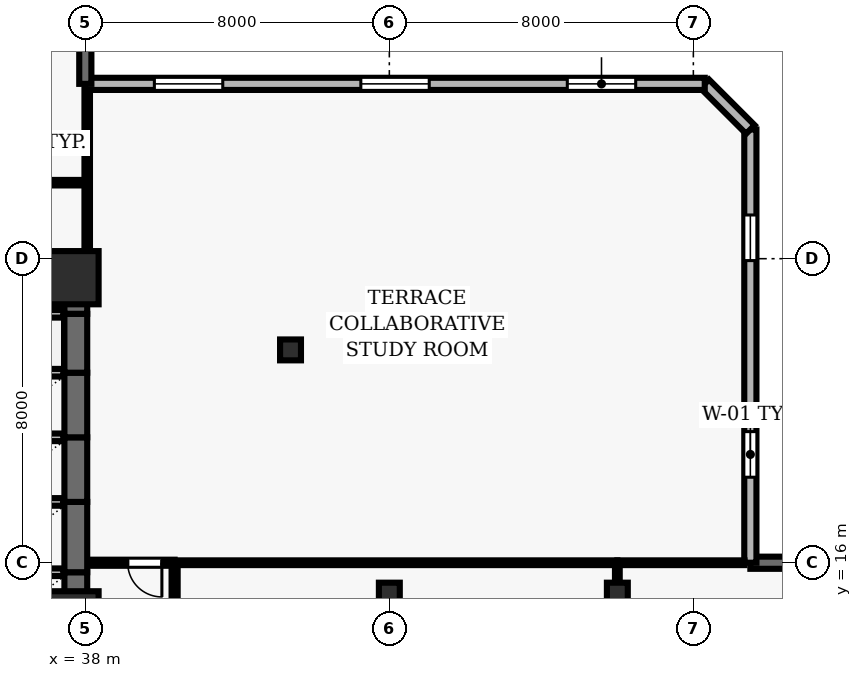
"""IFC4 building model, lengths in metres.
Left out: names, types, materials, properties, quantities, classifications, styles, units other than length and angle.
Written with IfcOpenShell. Run it as: python <this file> out.ifc"""

import sys

from ifc_helpers import new_model, si_unit, direction, frame, frame_2d, origin, origin_2d, place, context, subcontext, project, spatial, rectangle, hollow_rectangle, extrude, element, fill, save


model = new_model("IFC4")
c1 = context("Model", 3, precision=1e-05, world=origin(), true_north=direction((0.0, 1.0)))
c2 = subcontext(c1, "Body", "Model", "MODEL_VIEW")
j1 = project(units=[si_unit("LENGTHUNIT", "METRE"), si_unit("PLANEANGLEUNIT", "RADIAN")], contexts=[c1])
p1 = place(None, origin())
s1 = spatial("IfcSite", under=j1, at=p1, CompositionType="ELEMENT")
p2 = place(p1, origin())
s2 = spatial("IfcBuilding", under=s1, at=p2, CompositionType="ELEMENT")
p3 = place(p2, frame((0.0, 0.0, 34.9)))
s3 = spatial("IfcBuildingStorey", under=s2, at=p3, CompositionType="ELEMENT", Elevation=34.9)
for number, where, z_axis, x_axis in (
    (1, (37.65, 14.55, 0.0), (0.0, 0.0, 1.0), (1.0, 0.0, 0.0)),
    (2, (37.65, 23.5, 0.0), (0.0, 0.0, 1.0), (1.0, 0.0, 0.0)),
):
    element("IfcColumn", number, at=place(p3, frame(where, z_axis=z_axis, x_axis=x_axis)), inside=s3, PredefinedType="COLUMN", context=c2, shape_type="SweptSolid", body=[
        extrude(rectangle(XDim=1.4, YDim=1.4, at=origin_2d()), origin(), (0.0, 0.0, 1.0), 3.9),
    ])
for number, where, z_axis, x_axis in (
    (3, (46.0, 15.2, 0.0), (0.0, 0.0, 1.0), (1.0, 0.0, 0.0)),
    (4, (52.0, 15.2, 0.0), (0.0, 0.0, 1.0), (1.0, 0.0, 0.0)),
    (5, (43.4, 21.6, 0.0), (0.0, 0.0, 1.0), (1.0, 0.0, 0.0)),
):
    element("IfcColumn", number, at=place(p3, frame(where, z_axis=z_axis, x_axis=x_axis)), inside=s3, PredefinedType="COLUMN", context=c2, shape_type="SweptSolid", body=[
        extrude(hollow_rectangle(XDim=0.55, YDim=0.55, WallThickness=0.025, at=origin_2d()), origin(), (0.0, 0.0, 1.0), 3.9),
    ])
p4 = place(p3, frame((73.5, 16.0, 0.0), z_axis=(0.0, 0.0, 1.0), x_axis=(-1.0, 0.0, 0.0)))
e6 = element("IfcWall", 6, at=p4, inside=s3, PredefinedType="SOLIDWALL", context=c2, shape_type="SweptSolid", body=[
    extrude(rectangle(XDim=18.0, YDim=0.32, at=frame_2d((9.0, 0.0))), origin(), (0.0, 0.0, 1.0), 3.69),
])
p5 = place(p4, frame((7.3, 0.0, 0.0)))
e7 = element("IfcOpeningElement", 7, at=p5, cuts=e6, PredefinedType="OPENING", context=c2, shape_type="SweptSolid", body=[
    extrude(rectangle(XDim=1.0, YDim=2.2, at=frame_2d((0.5, 1.1))), frame((0.0, 0.17, 0.0), z_axis=(0.0, -1.0, 0.0), x_axis=(1.0, 0.0, 0.0)), (0.0, 0.0, 1.0), 0.34),
])
p6 = place(p4, frame((1.05, 0.0, 0.9)))
e8 = element("IfcOpeningElement", 8, at=p6, cuts=e6, PredefinedType="OPENING", context=c2, shape_type="SweptSolid", body=[
    extrude(rectangle(XDim=3.0, YDim=2.2, at=frame_2d((1.5, 1.1))), frame((0.0, 0.17, 0.0), z_axis=(0.0, -1.0, 0.0), x_axis=(1.0, 0.0, 0.0)), (0.0, 0.0, 1.0), 0.34),
])
p7 = place(p3, frame((55.5, 16.0, 0.0), z_axis=(0.0, 0.0, 1.0), x_axis=(0.0, 1.0, 0.0)))
e9 = element("IfcWall", 9, at=p7, inside=s3, PredefinedType="SOLIDWALL", context=c2, shape_type="SweptSolid", body=[
    extrude(rectangle(XDim=11.4, YDim=0.32, at=frame_2d((5.7, 0.0))), origin(), (0.0, 0.0, 1.0), 3.69),
])
p8 = place(p7, frame((2.25, 0.0, 0.9)))
e10 = element("IfcOpeningElement", 10, at=p8, cuts=e9, PredefinedType="OPENING", context=c2, shape_type="SweptSolid", body=[
    extrude(rectangle(XDim=1.2, YDim=1.6, at=frame_2d((0.6, 0.8))), frame((0.0, 0.17, 0.0), z_axis=(0.0, -1.0, 0.0), x_axis=(1.0, 0.0, 0.0)), (0.0, 0.0, 1.0), 0.34),
])
p9 = place(p7, frame((7.95, 0.0, 0.9)))
e11 = element("IfcOpeningElement", 11, at=p9, cuts=e9, PredefinedType="OPENING", context=c2, shape_type="SweptSolid", body=[
    extrude(rectangle(XDim=1.2, YDim=1.6, at=frame_2d((0.6, 0.8))), frame((0.0, 0.17, 0.0), z_axis=(0.0, -1.0, 0.0), x_axis=(1.0, 0.0, 0.0)), (0.0, 0.0, 1.0), 0.34),
])
p10 = place(p3, frame((55.5, 27.4, 0.0), z_axis=(0.0, 0.0, 1.0), x_axis=(-0.707034851297, 0.707178703759, 0.0)))
e12 = element("IfcWall", 12, at=p10, inside=s3, PredefinedType="SOLIDWALL", context=c2, shape_type="SweptSolid", body=[
    extrude(rectangle(XDim=1.697, YDim=0.32, at=frame_2d((0.849, 0.0))), origin(), (0.0, 0.0, 1.0), 3.69),
])
p11 = place(p3, frame((54.3, 28.6, 0.0), z_axis=(0.0, 0.0, 1.0), x_axis=(-1.0, 0.0, 0.0)))
e13 = element("IfcWall", 13, at=p11, inside=s3, PredefinedType="SOLIDWALL", context=c2, shape_type="SweptSolid", body=[
    extrude(rectangle(XDim=16.3, YDim=0.32, at=frame_2d((8.15, 0.0))), origin(), (0.0, 0.0, 1.0), 3.69),
])
p12 = place(p11, frame((1.817, 0.0, 0.9)))
e14 = element("IfcOpeningElement", 14, at=p12, cuts=e13, PredefinedType="OPENING", context=c2, shape_type="SweptSolid", body=[
    extrude(rectangle(XDim=1.8, YDim=1.6, at=frame_2d((0.9, 0.8))), frame((0.0, 0.17, 0.0), z_axis=(0.0, -1.0, 0.0), x_axis=(1.0, 0.0, 0.0)), (0.0, 0.0, 1.0), 0.34),
])
p13 = place(p11, frame((7.25, 0.0, 0.9)))
e15 = element("IfcOpeningElement", 15, at=p13, cuts=e13, PredefinedType="OPENING", context=c2, shape_type="SweptSolid", body=[
    extrude(rectangle(XDim=1.8, YDim=1.6, at=frame_2d((0.9, 0.8))), frame((0.0, 0.17, 0.0), z_axis=(0.0, -1.0, 0.0), x_axis=(1.0, 0.0, 0.0)), (0.0, 0.0, 1.0), 0.34),
])
p14 = place(p11, frame((12.683, 0.0, 0.9)))
e16 = element("IfcOpeningElement", 16, at=p14, cuts=e13, PredefinedType="OPENING", context=c2, shape_type="SweptSolid", body=[
    extrude(rectangle(XDim=1.8, YDim=1.6, at=frame_2d((0.9, 0.8))), frame((0.0, 0.17, 0.0), z_axis=(0.0, -1.0, 0.0), x_axis=(1.0, 0.0, 0.0)), (0.0, 0.0, 1.0), 0.34),
])
p15 = place(p3, frame((38.0, 28.6, 0.0), z_axis=(0.0, 0.0, 1.0), x_axis=(0.0, 1.0, 0.0)))
e17 = element("IfcWall", 17, at=p15, inside=s3, PredefinedType="SOLIDWALL", context=c2, shape_type="SweptSolid", body=[
    extrude(rectangle(XDim=22.9, YDim=0.32, at=frame_2d((11.45, 0.0))), origin(), (0.0, 0.0, 1.0), 3.69),
])
p16 = place(p15, frame((9.95, 0.0, 0.0)))
e18 = element("IfcOpeningElement", 18, at=p16, cuts=e17, PredefinedType="OPENING", context=c2, shape_type="SweptSolid", body=[
    extrude(rectangle(XDim=1.0, YDim=2.2, at=frame_2d((0.5, 1.1))), frame((0.0, 0.17, 0.0), z_axis=(0.0, -1.0, 0.0), x_axis=(1.0, 0.0, 0.0)), (0.0, 0.0, 1.0), 0.34),
])
p17 = place(p15, frame((2.262, 0.0, 0.9)))
e19 = element("IfcOpeningElement", 19, at=p17, cuts=e17, PredefinedType="OPENING", context=c2, shape_type="SweptSolid", body=[
    extrude(rectangle(XDim=2.1, YDim=1.6, at=frame_2d((1.05, 0.8))), frame((0.0, 0.17, 0.0), z_axis=(0.0, -1.0, 0.0), x_axis=(1.0, 0.0, 0.0)), (0.0, 0.0, 1.0), 0.34),
])
p18 = place(p15, frame((13.262, 0.0, 0.9)))
e20 = element("IfcOpeningElement", 20, at=p18, cuts=e17, PredefinedType="OPENING", context=c2, shape_type="SweptSolid", body=[
    extrude(rectangle(XDim=2.1, YDim=1.6, at=frame_2d((1.05, 0.8))), frame((0.0, 0.17, 0.0), z_axis=(0.0, -1.0, 0.0), x_axis=(1.0, 0.0, 0.0)), (0.0, 0.0, 1.0), 0.34),
])
p19 = place(p15, frame((18.987, 0.0, 0.9)))
e21 = element("IfcOpeningElement", 21, at=p19, cuts=e17, PredefinedType="OPENING", context=c2, shape_type="SweptSolid", body=[
    extrude(rectangle(XDim=2.1, YDim=1.6, at=frame_2d((1.05, 0.8))), frame((0.0, 0.17, 0.0), z_axis=(0.0, -1.0, 0.0), x_axis=(1.0, 0.0, 0.0)), (0.0, 0.0, 1.0), 0.34),
])
p20 = place(p3, frame((37.75, 13.9, 0.0), z_axis=(0.0, 0.0, 1.0), x_axis=(0.0, 1.0, 0.0)))
e22 = element("IfcWall", 22, at=p20, inside=s3, PredefinedType="SHEAR", context=c2, shape_type="SweptSolid", body=[
    extrude(rectangle(XDim=1.85, YDim=0.6, at=frame_2d((0.925, 0.0))), origin(), (0.0, 0.0, 1.0), 3.69),
])
p21 = place(p3, frame((37.42, 15.75, 0.0), z_axis=(0.0, 0.0, 1.0), x_axis=(-1.0, 0.0, 0.0)))
e23 = element("IfcWall", 23, at=p21, inside=s3, PredefinedType="SOLIDWALL", context=c2, shape_type="SweptSolid", body=[
    extrude(rectangle(XDim=2.14, YDim=0.2, at=frame_2d((1.07, 0.0))), origin(), (0.0, 0.0, 1.0), 3.69),
])
p22 = place(p3, frame((37.75, 15.75, 0.0), z_axis=(0.0, 0.0, 1.0), x_axis=(0.0, 1.0, 0.0)))
e24 = element("IfcWall", 24, at=p22, inside=s3, PredefinedType="SHEAR", context=c2, shape_type="SweptSolid", body=[
    extrude(rectangle(XDim=1.85, YDim=0.6, at=frame_2d((0.925, 0.0))), origin(), (0.0, 0.0, 1.0), 3.69),
])
p23 = place(p3, frame((37.42, 17.6, 0.0), z_axis=(0.0, 0.0, 1.0), x_axis=(-1.0, 0.0, 0.0)))
e25 = element("IfcWall", 25, at=p23, inside=s3, PredefinedType="SOLIDWALL", context=c2, shape_type="SweptSolid", body=[
    extrude(rectangle(XDim=2.14, YDim=0.2, at=frame_2d((1.07, 0.0))), origin(), (0.0, 0.0, 1.0), 3.69),
])
p24 = place(p3, frame((37.75, 17.6, 0.0), z_axis=(0.0, 0.0, 1.0), x_axis=(0.0, 1.0, 0.0)))
e26 = element("IfcWall", 26, at=p24, inside=s3, PredefinedType="SHEAR", context=c2, shape_type="SweptSolid", body=[
    extrude(rectangle(XDim=1.7, YDim=0.6, at=frame_2d((0.85, 0.0))), origin(), (0.0, 0.0, 1.0), 3.69),
])
p25 = place(p3, frame((37.42, 19.3, 0.0), z_axis=(0.0, 0.0, 1.0), x_axis=(-1.0, 0.0, 0.0)))
e27 = element("IfcWall", 27, at=p25, inside=s3, PredefinedType="SOLIDWALL", context=c2, shape_type="SweptSolid", body=[
    extrude(rectangle(XDim=2.14, YDim=0.2, at=frame_2d((1.07, 0.0))), origin(), (0.0, 0.0, 1.0), 3.69),
])
p26 = place(p3, frame((37.75, 19.3, 0.0), z_axis=(0.0, 0.0, 1.0), x_axis=(0.0, 1.0, 0.0)))
e28 = element("IfcWall", 28, at=p26, inside=s3, PredefinedType="SHEAR", context=c2, shape_type="SweptSolid", body=[
    extrude(rectangle(XDim=1.7, YDim=0.6, at=frame_2d((0.85, 0.0))), origin(), (0.0, 0.0, 1.0), 3.69),
])
p27 = place(p3, frame((37.42, 21.0, 0.0), z_axis=(0.0, 0.0, 1.0), x_axis=(-1.0, 0.0, 0.0)))
e29 = element("IfcWall", 29, at=p27, inside=s3, PredefinedType="SOLIDWALL", context=c2, shape_type="SweptSolid", body=[
    extrude(rectangle(XDim=2.14, YDim=0.2, at=frame_2d((1.07, 0.0))), origin(), (0.0, 0.0, 1.0), 3.69),
])
p28 = place(p3, frame((37.75, 21.0, 0.0), z_axis=(0.0, 0.0, 1.0), x_axis=(0.0, 1.0, 0.0)))
e30 = element("IfcWall", 30, at=p28, inside=s3, PredefinedType="SHEAR", context=c2, shape_type="SweptSolid", body=[
    extrude(rectangle(XDim=1.55, YDim=0.6, at=frame_2d((0.775, 0.0))), origin(), (0.0, 0.0, 1.0), 3.69),
])
p29 = place(p3, frame((37.42, 22.55, 0.0), z_axis=(0.0, 0.0, 1.0), x_axis=(-1.0, 0.0, 0.0)))
e31 = element("IfcWall", 31, at=p29, inside=s3, PredefinedType="SOLIDWALL", context=c2, shape_type="SweptSolid", body=[
    extrude(rectangle(XDim=2.14, YDim=0.2, at=frame_2d((1.07, 0.0))), origin(), (0.0, 0.0, 1.0), 3.69),
])
p30 = place(p3, frame((37.75, 22.55, 0.0), z_axis=(0.0, 0.0, 1.0), x_axis=(0.0, 1.0, 0.0)))
e32 = element("IfcWall", 32, at=p30, inside=s3, PredefinedType="SHEAR", context=c2, shape_type="SweptSolid", body=[
    extrude(rectangle(XDim=1.5, YDim=0.6, at=frame_2d((0.75, 0.0))), origin(), (0.0, 0.0, 1.0), 3.69),
])
p31 = place(p3, frame((37.42, 24.05, 0.0), z_axis=(0.0, 0.0, 1.0), x_axis=(-1.0, 0.0, 0.0)))
e33 = element("IfcWall", 33, at=p31, inside=s3, PredefinedType="SOLIDWALL", context=c2, shape_type="SweptSolid", body=[
    extrude(rectangle(XDim=2.14, YDim=0.2, at=frame_2d((1.07, 0.0))), origin(), (0.0, 0.0, 1.0), 3.69),
])
p32 = place(p3, frame((35.15, 26.0, 0.0), z_axis=(0.0, 0.0, 1.0), x_axis=(1.0, 0.0, 0.0)))
e34 = element("IfcWall", 34, at=p32, inside=s3, PredefinedType="PARTITIONING", context=c2, shape_type="SweptSolid", body=[
    extrude(rectangle(XDim=2.7, YDim=0.145, at=frame_2d((1.35, 0.0))), origin(), (0.0, 0.0, 1.0), 3.69),
])
p33 = place(p3, frame((40.35, 16.0, 0.0), z_axis=(0.0, 0.0, 1.0), x_axis=(-1.0, 0.0, 0.0)))
e35 = element("IfcWall", 35, at=p33, inside=s3, PredefinedType="PARTITIONING", context=c2, shape_type="SweptSolid", body=[
    extrude(rectangle(XDim=2.27, YDim=0.16, at=frame_2d((1.135, 0.0))), origin(), (0.0, 0.0, 1.0), 3.69),
])
p34 = place(p33, frame((0.335, 0.0, 0.0)))
e36 = element("IfcOpeningElement", 36, at=p34, cuts=e35, PredefinedType="OPENING", context=c2, shape_type="SweptSolid", body=[
    extrude(rectangle(XDim=0.9, YDim=2.1, at=frame_2d((0.45, 1.05))), frame((0.0, 0.09, 0.0), z_axis=(0.0, -1.0, 0.0), x_axis=(1.0, 0.0, 0.0)), (0.0, 0.0, 1.0), 0.18),
])
p35 = place(p3, frame((52.0, 16.0, 0.0), z_axis=(0.0, 0.0, 1.0), x_axis=(1.0, 0.0, 0.0)))
e37 = element("IfcWall", 37, at=p35, inside=s3, PredefinedType="PARTITIONING", context=c2, shape_type="SweptSolid", body=[
    extrude(rectangle(XDim=3.345, YDim=0.125, at=frame_2d((1.672, 0.0))), origin(), (0.0, 0.0, 1.0), 3.69),
])
p36 = place(p3, frame((52.0, 16.0, 0.0), z_axis=(0.0, 0.0, 1.0), x_axis=(-1.0, 0.0, 0.0)))
e38 = element("IfcWall", 38, at=p36, inside=s3, PredefinedType="PARTITIONING", context=c2, shape_type="SweptSolid", body=[
    extrude(rectangle(XDim=11.65, YDim=0.125, at=frame_2d((5.825, 0.0))), origin(), (0.0, 0.0, 1.0), 3.69),
])
p37 = place(p3, frame((38.05, 28.445, 0.0), z_axis=(0.0, 0.0, 1.0), x_axis=(0.0, -1.0, 0.0)))
e39 = element("IfcWall", 39, at=p37, inside=s3, PredefinedType="PARTITIONING", context=c2, shape_type="SweptSolid", body=[
    extrude(rectangle(XDim=4.395, YDim=0.145, at=frame_2d((2.198, 0.0))), origin(), (0.0, 0.0, 1.0), 3.055),
])
p38 = place(p3, frame((40.35, 10.425, 0.0), z_axis=(0.0, 0.0, 1.0), x_axis=(0.0, 1.0, 0.0)))
e40 = element("IfcWall", 40, at=p38, inside=s3, PredefinedType="PARTITIONING", context=c2, shape_type="SweptSolid", body=[
    extrude(rectangle(XDim=5.5, YDim=0.16, at=frame_2d((2.75, 0.0))), origin(), (0.0, 0.0, 1.0), 3.277),
])
p39 = place(p3, frame((52.0, 10.425, 0.0), z_axis=(0.0, 0.0, 1.0), x_axis=(0.0, 1.0, 0.0)))
e41 = element("IfcWall", 41, at=p39, inside=s3, PredefinedType="PARTITIONING", context=c2, shape_type="SweptSolid", body=[
    extrude(rectangle(XDim=5.518, YDim=0.125, at=frame_2d((2.759, 0.0))), origin(), (0.0, 0.0, 1.0), 3.055),
])
p40 = place(p8, origin())
e42 = element("IfcWindow", 42, at=p40, inside=s3, PartitioningType="SINGLE_PANEL", PredefinedType="WINDOW", context=c2, shape_type="SweptSolid", body=[
    extrude(rectangle(XDim=1.2, YDim=1.6, at=frame_2d((0.6, 0.8))), frame((0.0, 0.03, 0.0), z_axis=(0.0, -1.0, 0.0), x_axis=(1.0, 0.0, 0.0)), (0.0, 0.0, 1.0), 0.06),
])
fill(e10, e42)
p41 = place(p9, origin())
e43 = element("IfcWindow", 43, at=p41, inside=s3, PartitioningType="SINGLE_PANEL", PredefinedType="WINDOW", context=c2, shape_type="SweptSolid", body=[
    extrude(rectangle(XDim=1.2, YDim=1.6, at=frame_2d((0.6, 0.8))), frame((0.0, 0.03, 0.0), z_axis=(0.0, -1.0, 0.0), x_axis=(1.0, 0.0, 0.0)), (0.0, 0.0, 1.0), 0.06),
])
fill(e11, e43)
p42 = place(p12, origin())
e44 = element("IfcWindow", 44, at=p42, inside=s3, PartitioningType="SINGLE_PANEL", PredefinedType="WINDOW", context=c2, shape_type="SweptSolid", body=[
    extrude(rectangle(XDim=1.8, YDim=1.6, at=frame_2d((0.9, 0.8))), frame((0.0, 0.03, 0.0), z_axis=(0.0, -1.0, 0.0), x_axis=(1.0, 0.0, 0.0)), (0.0, 0.0, 1.0), 0.06),
])
fill(e14, e44)
p43 = place(p13, origin())
e45 = element("IfcWindow", 45, at=p43, inside=s3, PartitioningType="SINGLE_PANEL", PredefinedType="WINDOW", context=c2, shape_type="SweptSolid", body=[
    extrude(rectangle(XDim=1.8, YDim=1.6, at=frame_2d((0.9, 0.8))), frame((0.0, 0.03, 0.0), z_axis=(0.0, -1.0, 0.0), x_axis=(1.0, 0.0, 0.0)), (0.0, 0.0, 1.0), 0.06),
])
fill(e15, e45)
p44 = place(p14, origin())
e46 = element("IfcWindow", 46, at=p44, inside=s3, PartitioningType="SINGLE_PANEL", PredefinedType="WINDOW", context=c2, shape_type="SweptSolid", body=[
    extrude(rectangle(XDim=1.8, YDim=1.6, at=frame_2d((0.9, 0.8))), frame((0.0, 0.03, 0.0), z_axis=(0.0, -1.0, 0.0), x_axis=(1.0, 0.0, 0.0)), (0.0, 0.0, 1.0), 0.06),
])
fill(e16, e46)
p45 = place(p34, origin())
e47 = element("IfcDoor", 47, at=p45, inside=s3, OperationType="SINGLE_SWING_LEFT", PredefinedType="DOOR", context=c2, shape_type="SweptSolid", body=[
    extrude(rectangle(XDim=0.9, YDim=2.1, at=frame_2d((0.45, 1.05))), frame((0.0, 0.025, 0.0), z_axis=(0.0, -1.0, 0.0), x_axis=(1.0, 0.0, 0.0)), (0.0, 0.0, 1.0), 0.05),
])
fill(e36, e47)
save(model, sys.argv[1])
